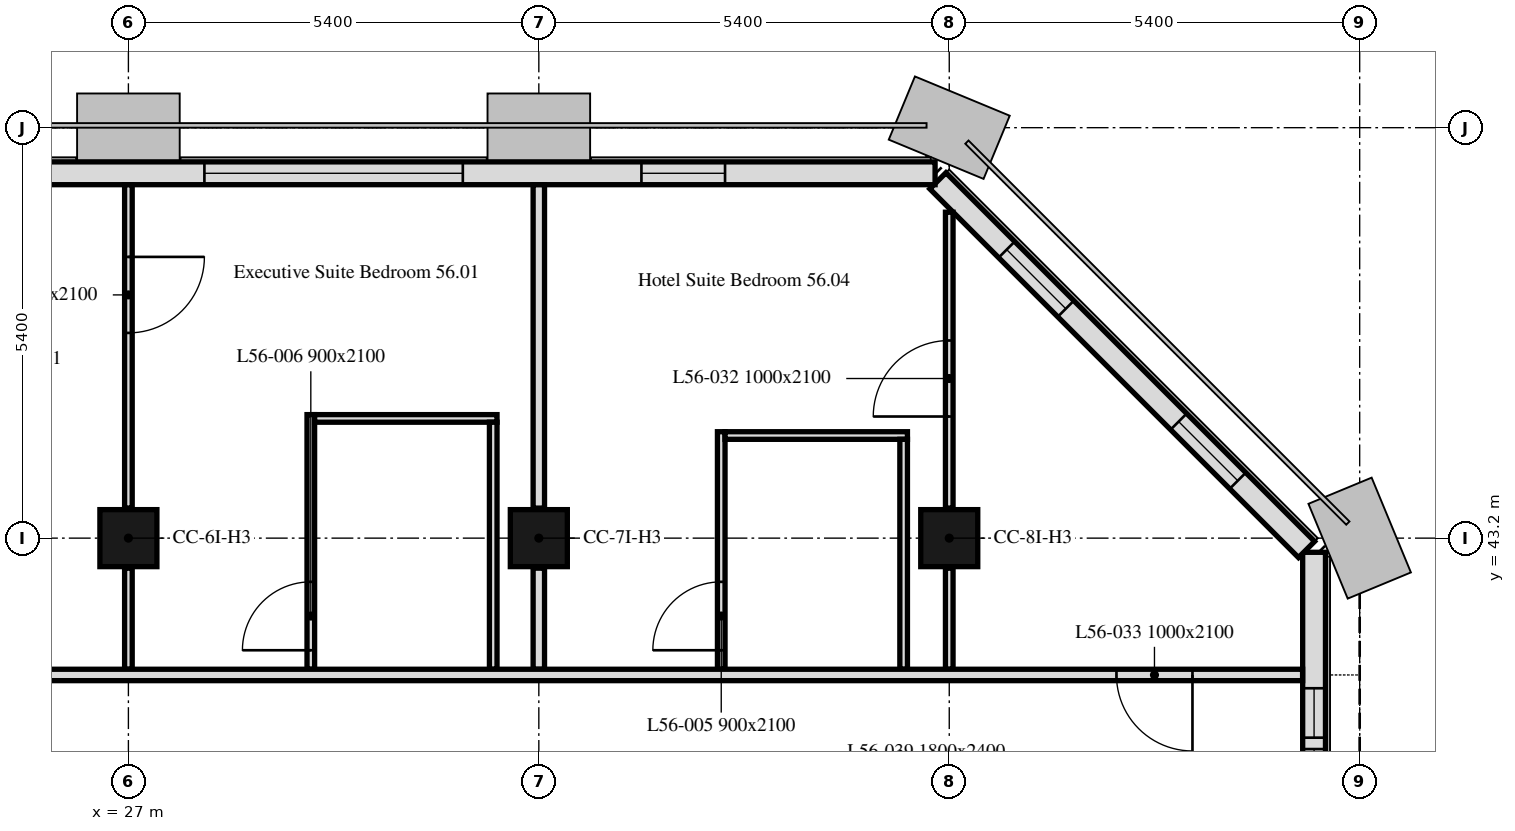
"""IFC4 building model, lengths in metres.
Left out: names, types, materials, properties, quantities, classifications, styles, units other than length and angle.
Written with IfcOpenShell. Run it as: python <this file> out.ifc"""

import sys

from ifc_helpers import new_model, si_unit, direction, frame, frame_2d, origin, origin_2d, place, context, subcontext, project, spatial, rectangle, extrude, element, fill, save


model = new_model("IFC4")
c1 = context("Model", 3, precision=1e-05, world=origin(), true_north=direction((0.0, 1.0)))
c2 = subcontext(c1, "Body", "Model", "MODEL_VIEW")
j1 = project(units=[si_unit("LENGTHUNIT", "METRE"), si_unit("PLANEANGLEUNIT", "RADIAN")], contexts=[c1])
p1 = place(None, origin())
s1 = spatial("IfcSite", under=j1, at=p1, CompositionType="ELEMENT")
p2 = place(p1, origin())
s2 = spatial("IfcBuilding", under=s1, at=p2, CompositionType="ELEMENT")
p3 = place(p2, frame((0.0, 0.0, 223.6)))
s3 = spatial("IfcBuildingStorey", under=s2, at=p3, CompositionType="ELEMENT", Elevation=223.6)
for number, where, z_axis, x_axis in (
    (1, (27.0, 43.2, 0.0), (0.0, 0.0, 1.0), (1.0, 0.0, 0.0)),
    (2, (32.4, 43.2, 0.0), (0.0, 0.0, 1.0), (1.0, 0.0, 0.0)),
    (3, (37.8, 43.2, 0.0), (0.0, 0.0, 1.0), (1.0, 0.0, 0.0)),
):
    element("IfcColumn", number, at=place(p3, frame(where, z_axis=z_axis, x_axis=x_axis)), inside=s3, PredefinedType="COLUMN", context=c2, shape_type="SweptSolid", body=[
        extrude(rectangle(XDim=0.75, YDim=0.75, at=origin_2d()), origin(), (0.0, 0.0, 1.0), 3.0),
    ])
p4 = place(p3, frame((42.6, 32.4, 0.0), z_axis=(0.0, 0.0, 1.0), x_axis=(0.0, 1.0, 0.0)))
e4 = element("IfcWall", 4, at=p4, inside=s3, PredefinedType="SOLIDWALL", context=c2, shape_type="SweptSolid", body=[
    extrude(rectangle(XDim=10.614, YDim=0.3, at=frame_2d((5.307, 0.0))), origin(), (0.0, 0.0, 1.0), 3.0),
])
p5 = place(p4, frame((1.35, 0.0, 0.9)))
e5 = element("IfcOpeningElement", 5, at=p5, cuts=e4, PredefinedType="OPENING", context=c2, shape_type="SweptSolid", body=[
    extrude(rectangle(XDim=1.1, YDim=1.7, at=frame_2d((0.55, 0.85))), frame((0.0, 0.16, 0.0), z_axis=(0.0, -1.0, 0.0), x_axis=(1.0, 0.0, 0.0)), (0.0, 0.0, 1.0), 0.32),
])
p6 = place(p4, frame((2.95, 0.0, 0.9)))
e6 = element("IfcOpeningElement", 6, at=p6, cuts=e4, PredefinedType="OPENING", context=c2, shape_type="SweptSolid", body=[
    extrude(rectangle(XDim=1.1, YDim=1.7, at=frame_2d((0.55, 0.85))), frame((0.0, 0.16, 0.0), z_axis=(0.0, -1.0, 0.0), x_axis=(1.0, 0.0, 0.0)), (0.0, 0.0, 1.0), 0.32),
])
p7 = place(p4, frame((7.375, 0.0, 0.9)))
e7 = element("IfcOpeningElement", 7, at=p7, cuts=e4, PredefinedType="OPENING", context=c2, shape_type="SweptSolid", body=[
    extrude(rectangle(XDim=0.65, YDim=1.7, at=frame_2d((0.325, 0.85))), frame((0.0, 0.16, 0.0), z_axis=(0.0, -1.0, 0.0), x_axis=(1.0, 0.0, 0.0)), (0.0, 0.0, 1.0), 0.32),
])
p8 = place(p4, frame((8.175, 0.0, 0.9)))
e8 = element("IfcOpeningElement", 8, at=p8, cuts=e4, PredefinedType="OPENING", context=c2, shape_type="SweptSolid", body=[
    extrude(rectangle(XDim=0.65, YDim=1.7, at=frame_2d((0.325, 0.85))), frame((0.0, 0.16, 0.0), z_axis=(0.0, -1.0, 0.0), x_axis=(1.0, 0.0, 0.0)), (0.0, 0.0, 1.0), 0.32),
])
p9 = place(p3, frame((42.501, 43.051, 0.0), z_axis=(0.0, 0.0, 1.0), x_axis=(-0.707106781187, 0.707106781187, 0.0)))
e9 = element("IfcWall", 9, at=p9, inside=s3, PredefinedType="SOLIDWALL", context=c2, shape_type="SweptSolid", body=[
    extrude(rectangle(XDim=6.86, YDim=0.3, at=frame_2d((3.43, 0.0))), origin(), (0.0, 0.0, 1.0), 3.0),
])
p10 = place(p9, frame((1.28, 0.0, 0.9)))
e10 = element("IfcOpeningElement", 10, at=p10, cuts=e9, PredefinedType="OPENING", context=c2, shape_type="SweptSolid", body=[
    extrude(rectangle(XDim=1.1, YDim=1.7, at=frame_2d((0.55, 0.85))), frame((0.0, 0.16, 0.0), z_axis=(0.0, -1.0, 0.0), x_axis=(1.0, 0.0, 0.0)), (0.0, 0.0, 1.0), 0.32),
])
p11 = place(p9, frame((4.48, 0.0, 0.9)))
e11 = element("IfcOpeningElement", 11, at=p11, cuts=e9, PredefinedType="OPENING", context=c2, shape_type="SweptSolid", body=[
    extrude(rectangle(XDim=1.1, YDim=1.7, at=frame_2d((0.55, 0.85))), frame((0.0, 0.16, 0.0), z_axis=(0.0, -1.0, 0.0), x_axis=(1.0, 0.0, 0.0)), (0.0, 0.0, 1.0), 0.32),
])
p12 = place(p3, frame((37.614, 48.0, 0.0), z_axis=(0.0, 0.0, 1.0), x_axis=(-1.0, 0.0, 0.0)))
e12 = element("IfcWall", 12, at=p12, inside=s3, PredefinedType="SOLIDWALL", context=c2, shape_type="SweptSolid", body=[
    extrude(rectangle(XDim=32.027, YDim=0.3, at=frame_2d((16.014, 0.0))), origin(), (0.0, 0.0, 1.0), 3.0),
])
p13 = place(p12, frame((2.764, 0.0, 0.9)))
e13 = element("IfcOpeningElement", 13, at=p13, cuts=e12, PredefinedType="OPENING", context=c2, shape_type="SweptSolid", body=[
    extrude(rectangle(XDim=1.1, YDim=1.7, at=frame_2d((0.55, 0.85))), frame((0.0, 0.16, 0.0), z_axis=(0.0, -1.0, 0.0), x_axis=(1.0, 0.0, 0.0)), (0.0, 0.0, 1.0), 0.32),
])
p14 = place(p12, frame((6.214, 0.0, 0.9)))
e14 = element("IfcOpeningElement", 14, at=p14, cuts=e12, PredefinedType="OPENING", context=c2, shape_type="SweptSolid", body=[
    extrude(rectangle(XDim=3.4, YDim=1.7, at=frame_2d((1.7, 0.85))), frame((0.0, 0.16, 0.0), z_axis=(0.0, -1.0, 0.0), x_axis=(1.0, 0.0, 0.0)), (0.0, 0.0, 1.0), 0.32),
])
p15 = place(p12, frame((13.564, 0.0, 0.9)))
e15 = element("IfcOpeningElement", 15, at=p15, cuts=e12, PredefinedType="OPENING", context=c2, shape_type="SweptSolid", body=[
    extrude(rectangle(XDim=1.1, YDim=1.7, at=frame_2d((0.55, 0.85))), frame((0.0, 0.16, 0.0), z_axis=(0.0, -1.0, 0.0), x_axis=(1.0, 0.0, 0.0)), (0.0, 0.0, 1.0), 0.32),
])
p16 = place(p12, frame((17.014, 0.0, 0.9)))
e16 = element("IfcOpeningElement", 16, at=p16, cuts=e12, PredefinedType="OPENING", context=c2, shape_type="SweptSolid", body=[
    extrude(rectangle(XDim=3.4, YDim=1.7, at=frame_2d((1.7, 0.85))), frame((0.0, 0.16, 0.0), z_axis=(0.0, -1.0, 0.0), x_axis=(1.0, 0.0, 0.0)), (0.0, 0.0, 1.0), 0.32),
])
p17 = place(p12, frame((24.364, 0.0, 0.9)))
e17 = element("IfcOpeningElement", 17, at=p17, cuts=e12, PredefinedType="OPENING", context=c2, shape_type="SweptSolid", body=[
    extrude(rectangle(XDim=1.1, YDim=1.7, at=frame_2d((0.55, 0.85))), frame((0.0, 0.16, 0.0), z_axis=(0.0, -1.0, 0.0), x_axis=(1.0, 0.0, 0.0)), (0.0, 0.0, 1.0), 0.32),
])
p18 = place(p12, frame((27.814, 0.0, 0.9)))
e18 = element("IfcOpeningElement", 18, at=p18, cuts=e12, PredefinedType="OPENING", context=c2, shape_type="SweptSolid", body=[
    extrude(rectangle(XDim=3.4, YDim=1.7, at=frame_2d((1.7, 0.85))), frame((0.0, 0.16, 0.0), z_axis=(0.0, -1.0, 0.0), x_axis=(1.0, 0.0, 0.0)), (0.0, 0.0, 1.0), 0.32),
])
p19 = place(p3, frame((32.4, 47.849, 0.0), z_axis=(0.0, 0.0, 1.0), x_axis=(0.0, -1.0, 0.0)))
e19 = element("IfcWall", 19, at=p19, inside=s3, PredefinedType="PARTITIONING", context=c2, shape_type="SweptSolid", body=[
    extrude(rectangle(XDim=4.254, YDim=0.15, at=frame_2d((2.127, 0.0))), origin(), (0.0, 0.0, 1.0), 2.4),
])
p20 = place(p3, frame((32.4, 42.805, 0.0), z_axis=(0.0, 0.0, 1.0), x_axis=(0.0, -1.0, 0.0)))
e20 = element("IfcWall", 20, at=p20, inside=s3, PredefinedType="PARTITIONING", context=c2, shape_type="SweptSolid", body=[
    extrude(rectangle(XDim=1.33, YDim=0.15, at=frame_2d((0.665, 0.0))), origin(), (0.0, 0.0, 1.0), 2.4),
])
p21 = place(p3, frame((34.8, 41.475, 0.0), z_axis=(0.0, 0.0, 1.0), x_axis=(0.0, 1.0, 0.0)))
e21 = element("IfcWall", 21, at=p21, inside=s3, PredefinedType="PARTITIONING", context=c2, shape_type="SweptSolid", body=[
    extrude(rectangle(XDim=3.125, YDim=0.1, at=frame_2d((1.562, 0.0))), origin(), (0.0, 0.0, 1.0), 3.0),
])
p22 = place(p21, frame((0.25, 0.0, 0.0)))
e22 = element("IfcOpeningElement", 22, at=p22, cuts=e21, PredefinedType="OPENING", context=c2, shape_type="SweptSolid", body=[
    extrude(rectangle(XDim=0.9, YDim=2.1, at=frame_2d((0.45, 1.05))), frame((0.0, 0.05, 0.0), z_axis=(0.0, -1.0, 0.0), x_axis=(1.0, 0.0, 0.0)), (0.0, 0.0, 1.0), 0.1),
])
p23 = place(p3, frame((34.85, 44.55, 0.0), z_axis=(0.0, 0.0, 1.0), x_axis=(1.0, 0.0, 0.0)))
e23 = element("IfcWall", 23, at=p23, inside=s3, PredefinedType="PARTITIONING", context=c2, shape_type="SweptSolid", body=[
    extrude(rectangle(XDim=2.4, YDim=0.1, at=frame_2d((1.2, 0.0))), origin(), (0.0, 0.0, 1.0), 3.0),
])
p24 = place(p3, frame((37.2, 44.5, 0.0), z_axis=(0.0, 0.0, 1.0), x_axis=(0.0, -1.0, 0.0)))
e24 = element("IfcWall", 24, at=p24, inside=s3, PredefinedType="PARTITIONING", context=c2, shape_type="SweptSolid", body=[
    extrude(rectangle(XDim=3.025, YDim=0.1, at=frame_2d((1.512, 0.0))), origin(), (0.0, 0.0, 1.0), 3.0),
])
p25 = place(p3, frame((37.8, 41.475, 0.0), z_axis=(0.0, 0.0, 1.0), x_axis=(0.0, 1.0, 0.0)))
e25 = element("IfcWall", 25, at=p25, inside=s3, PredefinedType="PARTITIONING", context=c2, shape_type="SweptSolid", body=[
    extrude(rectangle(XDim=1.33, YDim=0.1, at=frame_2d((0.665, 0.0))), origin(), (0.0, 0.0, 1.0), 3.0),
])
p26 = place(p3, frame((37.8, 43.595, 0.0), z_axis=(0.0, 0.0, 1.0), x_axis=(0.0, 1.0, 0.0)))
e26 = element("IfcWall", 26, at=p26, inside=s3, PredefinedType="PARTITIONING", context=c2, shape_type="SweptSolid", body=[
    extrude(rectangle(XDim=3.893, YDim=0.1, at=frame_2d((1.946, 0.0))), origin(), (0.0, 0.0, 1.0), 3.0),
])
p27 = place(p26, frame((1.205, 0.0, 0.0)))
e27 = element("IfcOpeningElement", 27, at=p27, cuts=e26, PredefinedType="OPENING", context=c2, shape_type="SweptSolid", body=[
    extrude(rectangle(XDim=1.0, YDim=2.1, at=frame_2d((0.5, 1.05))), frame((0.0, 0.05, 0.0), z_axis=(0.0, -1.0, 0.0), x_axis=(1.0, 0.0, 0.0)), (0.0, 0.0, 1.0), 0.1),
])
p28 = place(p3, frame((27.0, 47.849, 0.0), z_axis=(0.0, 0.0, 1.0), x_axis=(0.0, -1.0, 0.0)))
e28 = element("IfcWall", 28, at=p28, inside=s3, PredefinedType="PARTITIONING", context=c2, shape_type="SweptSolid", body=[
    extrude(rectangle(XDim=4.254, YDim=0.1, at=frame_2d((2.127, 0.0))), origin(), (0.0, 0.0, 1.0), 2.4),
])
p29 = place(p28, frame((0.949, 0.0, 0.0)))
e29 = element("IfcOpeningElement", 29, at=p29, cuts=e28, PredefinedType="OPENING", context=c2, shape_type="SweptSolid", body=[
    extrude(rectangle(XDim=1.0, YDim=2.1, at=frame_2d((0.5, 1.05))), frame((0.0, 0.05, 0.0), z_axis=(0.0, -1.0, 0.0), x_axis=(1.0, 0.0, 0.0)), (0.0, 0.0, 1.0), 0.1),
])
p30 = place(p3, frame((27.0, 42.805, 0.0), z_axis=(0.0, 0.0, 1.0), x_axis=(0.0, -1.0, 0.0)))
e30 = element("IfcWall", 30, at=p30, inside=s3, PredefinedType="PARTITIONING", context=c2, shape_type="SweptSolid", body=[
    extrude(rectangle(XDim=1.33, YDim=0.1, at=frame_2d((0.665, 0.0))), origin(), (0.0, 0.0, 1.0), 2.4),
])
p31 = place(p3, frame((29.4, 41.475, 0.0), z_axis=(0.0, 0.0, 1.0), x_axis=(0.0, 1.0, 0.0)))
e31 = element("IfcWall", 31, at=p31, inside=s3, PredefinedType="PARTITIONING", context=c2, shape_type="SweptSolid", body=[
    extrude(rectangle(XDim=3.35, YDim=0.1, at=frame_2d((1.675, 0.0))), origin(), (0.0, 0.0, 1.0), 3.0),
])
p32 = place(p31, frame((0.25, 0.0, 0.0)))
e32 = element("IfcOpeningElement", 32, at=p32, cuts=e31, PredefinedType="OPENING", context=c2, shape_type="SweptSolid", body=[
    extrude(rectangle(XDim=0.9, YDim=2.1, at=frame_2d((0.45, 1.05))), frame((0.0, 0.05, 0.0), z_axis=(0.0, -1.0, 0.0), x_axis=(1.0, 0.0, 0.0)), (0.0, 0.0, 1.0), 0.1),
])
p33 = place(p3, frame((29.45, 44.775, 0.0), z_axis=(0.0, 0.0, 1.0), x_axis=(1.0, 0.0, 0.0)))
e33 = element("IfcWall", 33, at=p33, inside=s3, PredefinedType="PARTITIONING", context=c2, shape_type="SweptSolid", body=[
    extrude(rectangle(XDim=2.4, YDim=0.1, at=frame_2d((1.2, 0.0))), origin(), (0.0, 0.0, 1.0), 3.0),
])
p34 = place(p3, frame((31.8, 44.725, 0.0), z_axis=(0.0, 0.0, 1.0), x_axis=(0.0, -1.0, 0.0)))
e34 = element("IfcWall", 34, at=p34, inside=s3, PredefinedType="PARTITIONING", context=c2, shape_type="SweptSolid", body=[
    extrude(rectangle(XDim=3.25, YDim=0.1, at=frame_2d((1.625, 0.0))), origin(), (0.0, 0.0, 1.0), 3.0),
])
p35 = place(p3, frame((42.449, 41.4, 0.0), z_axis=(0.0, 0.0, 1.0), x_axis=(-1.0, 0.0, 0.0)))
e35 = element("IfcWall", 35, at=p35, inside=s3, PredefinedType="PARTITIONING", context=c2, shape_type="SweptSolid", body=[
    extrude(rectangle(XDim=41.698, YDim=0.15, at=frame_2d((20.849, 0.0))), origin(), (0.0, 0.0, 1.0), 2.4),
])
p36 = place(p35, frame((1.449, 0.0, 0.0)))
e36 = element("IfcOpeningElement", 36, at=p36, cuts=e35, PredefinedType="OPENING", context=c2, shape_type="SweptSolid", body=[
    extrude(rectangle(XDim=1.0, YDim=2.1, at=frame_2d((0.5, 1.05))), frame((0.0, 0.075, 0.0), z_axis=(0.0, -1.0, 0.0), x_axis=(1.0, 0.0, 0.0)), (0.0, 0.0, 1.0), 0.15),
])
p37 = place(p35, frame((29.249, 0.0, 0.0)))
e37 = element("IfcOpeningElement", 37, at=p37, cuts=e35, PredefinedType="OPENING", context=c2, shape_type="SweptSolid", body=[
    extrude(rectangle(XDim=1.0, YDim=2.1, at=frame_2d((0.5, 1.05))), frame((0.0, 0.075, 0.0), z_axis=(0.0, -1.0, 0.0), x_axis=(1.0, 0.0, 0.0)), (0.0, 0.0, 1.0), 0.15),
])
p38 = place(p35, frame((37.599, 0.0, 0.0)))
e38 = element("IfcOpeningElement", 38, at=p38, cuts=e35, PredefinedType="OPENING", context=c2, shape_type="SweptSolid", body=[
    extrude(rectangle(XDim=1.0, YDim=2.1, at=frame_2d((0.5, 1.05))), frame((0.0, 0.075, 0.0), z_axis=(0.0, -1.0, 0.0), x_axis=(1.0, 0.0, 0.0)), (0.0, 0.0, 1.0), 0.15),
])
p39 = place(p35, frame((17.649, 0.0, 0.0)))
e39 = element("IfcOpeningElement", 39, at=p39, cuts=e35, PredefinedType="OPENING", context=c2, shape_type="SweptSolid", body=[
    extrude(rectangle(XDim=1.0, YDim=2.1, at=frame_2d((0.5, 1.05))), frame((0.0, 0.075, 0.0), z_axis=(0.0, -1.0, 0.0), x_axis=(1.0, 0.0, 0.0)), (0.0, 0.0, 1.0), 0.15),
])
p40 = place(p7, origin())
e40 = element("IfcWindow", 40, at=p40, inside=s3, PartitioningType="SINGLE_PANEL", PredefinedType="WINDOW", context=c2, shape_type="SweptSolid", body=[
    extrude(rectangle(XDim=0.65, YDim=1.7, at=frame_2d((0.325, 0.85))), frame((0.0, 0.03, 0.0), z_axis=(0.0, -1.0, 0.0), x_axis=(1.0, 0.0, 0.0)), (0.0, 0.0, 1.0), 0.06),
])
fill(e7, e40)
p41 = place(p8, origin())
e41 = element("IfcWindow", 41, at=p41, inside=s3, PartitioningType="SINGLE_PANEL", PredefinedType="WINDOW", context=c2, shape_type="SweptSolid", body=[
    extrude(rectangle(XDim=0.65, YDim=1.7, at=frame_2d((0.325, 0.85))), frame((0.0, 0.03, 0.0), z_axis=(0.0, -1.0, 0.0), x_axis=(1.0, 0.0, 0.0)), (0.0, 0.0, 1.0), 0.06),
])
fill(e8, e41)
p42 = place(p10, origin())
e42 = element("IfcWindow", 42, at=p42, inside=s3, PartitioningType="SINGLE_PANEL", PredefinedType="WINDOW", context=c2, shape_type="SweptSolid", body=[
    extrude(rectangle(XDim=1.1, YDim=1.7, at=frame_2d((0.55, 0.85))), frame((0.0, 0.03, 0.0), z_axis=(0.0, -1.0, 0.0), x_axis=(1.0, 0.0, 0.0)), (0.0, 0.0, 1.0), 0.06),
])
fill(e10, e42)
p43 = place(p11, origin())
e43 = element("IfcWindow", 43, at=p43, inside=s3, PartitioningType="SINGLE_PANEL", PredefinedType="WINDOW", context=c2, shape_type="SweptSolid", body=[
    extrude(rectangle(XDim=1.1, YDim=1.7, at=frame_2d((0.55, 0.85))), frame((0.0, 0.03, 0.0), z_axis=(0.0, -1.0, 0.0), x_axis=(1.0, 0.0, 0.0)), (0.0, 0.0, 1.0), 0.06),
])
fill(e11, e43)
p44 = place(p13, origin())
e44 = element("IfcWindow", 44, at=p44, inside=s3, PartitioningType="SINGLE_PANEL", PredefinedType="WINDOW", context=c2, shape_type="SweptSolid", body=[
    extrude(rectangle(XDim=1.1, YDim=1.7, at=frame_2d((0.55, 0.85))), frame((0.0, 0.03, 0.0), z_axis=(0.0, -1.0, 0.0), x_axis=(1.0, 0.0, 0.0)), (0.0, 0.0, 1.0), 0.06),
])
fill(e13, e44)
p45 = place(p14, origin())
e45 = element("IfcWindow", 45, at=p45, inside=s3, PartitioningType="SINGLE_PANEL", PredefinedType="WINDOW", context=c2, shape_type="SweptSolid", body=[
    extrude(rectangle(XDim=3.4, YDim=1.7, at=frame_2d((1.7, 0.85))), frame((0.0, 0.03, 0.0), z_axis=(0.0, -1.0, 0.0), x_axis=(1.0, 0.0, 0.0)), (0.0, 0.0, 1.0), 0.06),
])
fill(e14, e45)
p46 = place(p22, origin())
e46 = element("IfcDoor", 46, at=p46, inside=s3, OperationType="SINGLE_SWING_RIGHT", PredefinedType="DOOR", context=c2, shape_type="SweptSolid", body=[
    extrude(rectangle(XDim=0.9, YDim=2.1, at=frame_2d((0.45, 1.05))), frame((0.0, 0.025, 0.0), z_axis=(0.0, -1.0, 0.0), x_axis=(1.0, 0.0, 0.0)), (0.0, 0.0, 1.0), 0.05),
])
fill(e22, e46)
p47 = place(p32, origin())
e47 = element("IfcDoor", 47, at=p47, inside=s3, OperationType="SINGLE_SWING_RIGHT", PredefinedType="DOOR", context=c2, shape_type="SweptSolid", body=[
    extrude(rectangle(XDim=0.9, YDim=2.1, at=frame_2d((0.45, 1.05))), frame((0.0, 0.025, 0.0), z_axis=(0.0, -1.0, 0.0), x_axis=(1.0, 0.0, 0.0)), (0.0, 0.0, 1.0), 0.05),
])
fill(e32, e47)
p48 = place(p27, origin())
e48 = element("IfcDoor", 48, at=p48, inside=s3, OperationType="SINGLE_SWING_RIGHT", PredefinedType="DOOR", context=c2, shape_type="SweptSolid", body=[
    extrude(rectangle(XDim=1.0, YDim=2.1, at=frame_2d((0.5, 1.05))), frame((0.0, 0.025, 0.0), z_axis=(0.0, -1.0, 0.0), x_axis=(1.0, 0.0, 0.0)), (0.0, 0.0, 1.0), 0.05),
])
fill(e27, e48)
p49 = place(p36, origin())
e49 = element("IfcDoor", 49, at=p49, inside=s3, OperationType="SINGLE_SWING_LEFT", PredefinedType="DOOR", context=c2, shape_type="SweptSolid", body=[
    extrude(rectangle(XDim=1.0, YDim=2.1, at=frame_2d((0.5, 1.05))), frame((0.0, 0.025, 0.0), z_axis=(0.0, -1.0, 0.0), x_axis=(1.0, 0.0, 0.0)), (0.0, 0.0, 1.0), 0.05),
])
fill(e36, e49)
p50 = place(p29, origin())
e50 = element("IfcDoor", 50, at=p50, inside=s3, OperationType="SINGLE_SWING_RIGHT", PredefinedType="DOOR", context=c2, shape_type="SweptSolid", body=[
    extrude(rectangle(XDim=1.0, YDim=2.1, at=frame_2d((0.5, 1.05))), frame((0.0, 0.025, 0.0), z_axis=(0.0, -1.0, 0.0), x_axis=(1.0, 0.0, 0.0)), (0.0, 0.0, 1.0), 0.05),
])
fill(e29, e50)
save(model, sys.argv[1])
